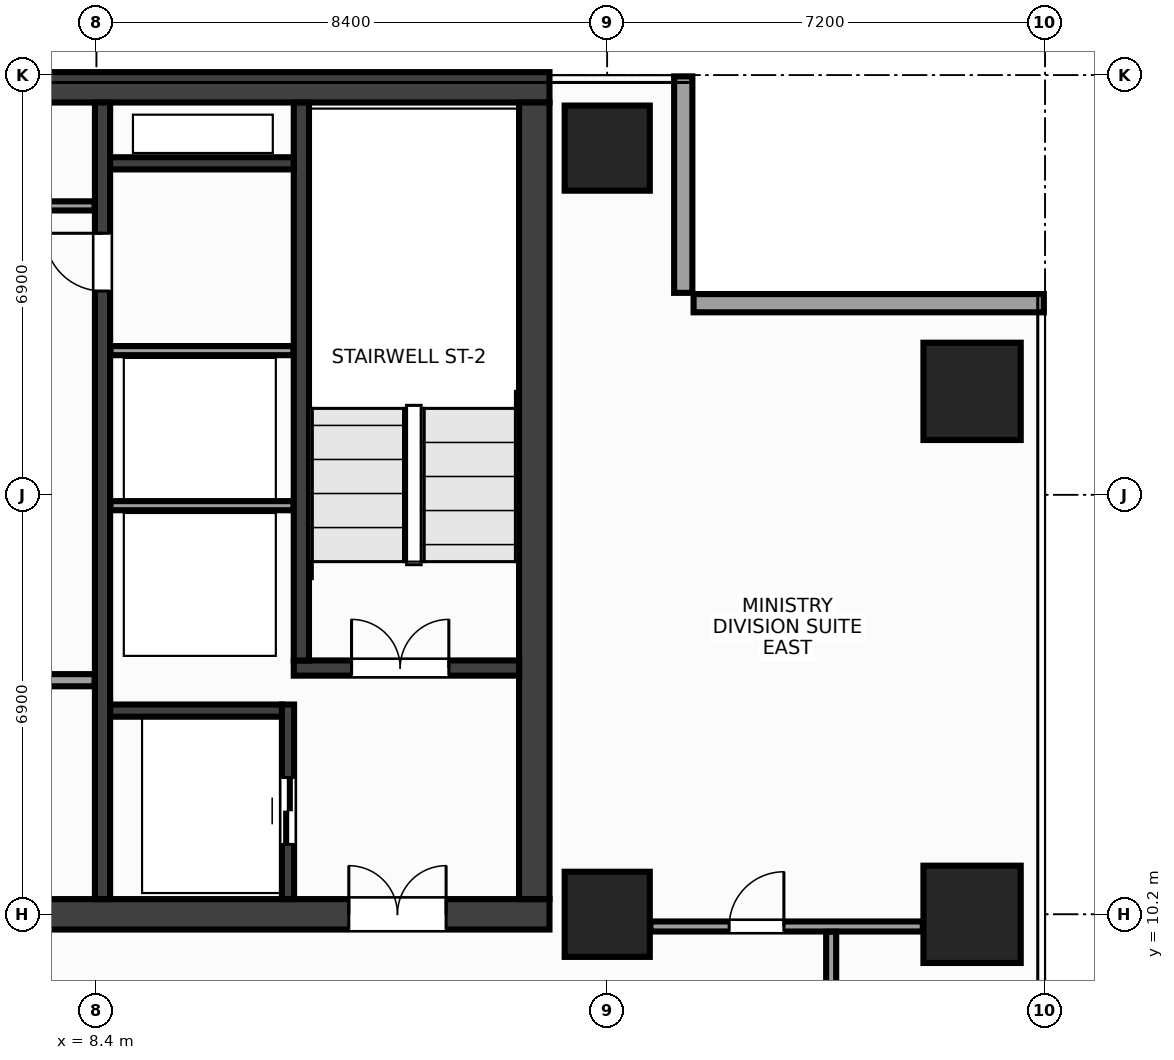
"""IFC4 building model, lengths in metres.
Left out: names, types, materials, properties, quantities, classifications, styles, units other than length and angle.
Written with IfcOpenShell. Run it as: python <this file> out.ifc"""

import sys

from ifc_helpers import new_model, si_unit, direction, frame, frame_2d, origin, origin_2d, place, context, subcontext, project, spatial, rectangle, extrude, source, transform, mapped, element, fill, save


model = new_model("IFC4")
c1 = context("Model", 3, precision=1e-05, world=origin(), true_north=direction((0.0, 1.0)))
c2 = subcontext(c1, "Body", "Model", "MODEL_VIEW")
j1 = project(units=[si_unit("LENGTHUNIT", "METRE"), si_unit("PLANEANGLEUNIT", "RADIAN")], contexts=[c1])
p1 = place(None, origin())
s1 = spatial("IfcSite", under=j1, at=p1, CompositionType="ELEMENT")
p2 = place(p1, origin())
s2 = spatial("IfcBuilding", under=s1, at=p2, CompositionType="ELEMENT")
p3 = place(p2, frame((0.0, 0.0, 218.0)))
s3 = spatial("IfcBuildingStorey", under=s2, at=p3, CompositionType="ELEMENT", Elevation=218.0)
m1 = source(origin(), c2, "Body", "SweptSolid", [
    extrude(rectangle(XDim=31.7, YDim=0.5, at=frame_2d((15.85, 0.0))), origin(), (0.0, 0.0, 1.0), 3.6),
])
p4 = place(p3, frame((-15.85, 23.8, 0.0), z_axis=(0.0, 0.0, 1.0), x_axis=(1.0, 0.0, 0.0)))
e1 = element("IfcWall", 1, at=p4, inside=s3, PredefinedType="SHEAR", context=c2, shape_type="MappedRepresentation", body=[
    mapped(m1, transform((0.0, 0.0, 0.0), x_axis=(1.0, 0.0, 0.0), y_axis=(0.0, 1.0, 0.0), z_axis=(0.0, 0.0, 1.0), scale=1.0)),
])
p5 = place(p3, frame((-15.85, 10.2, 0.0), z_axis=(0.0, 0.0, 1.0), x_axis=(1.0, 0.0, 0.0)))
e2 = element("IfcWall", 2, at=p5, inside=s3, PredefinedType="SHEAR", context=c2, shape_type="MappedRepresentation", body=[
    mapped(m1, transform((0.0, 0.0, 0.0), x_axis=(1.0, 0.0, 0.0), y_axis=(0.0, 1.0, 0.0), z_axis=(0.0, 0.0, 1.0), scale=1.0)),
])
p6 = place(p5, frame((1.7, 0.0, 0.0)))
e3 = element("IfcOpeningElement", 3, at=p6, cuts=e2, PredefinedType="OPENING", context=c2, shape_type="SweptSolid", body=[
    extrude(rectangle(XDim=1.6, YDim=2.15, at=frame_2d((0.8, 1.075))), frame((0.0, 0.262, 0.0), z_axis=(0.0, -1.0, 0.0), x_axis=(1.0, 0.0, 0.0)), (0.0, 0.0, 1.0), 0.524),
])
p7 = place(p5, frame((28.4, 0.0, 0.0)))
e4 = element("IfcOpeningElement", 4, at=p7, cuts=e2, PredefinedType="OPENING", context=c2, shape_type="SweptSolid", body=[
    extrude(rectangle(XDim=1.6, YDim=2.15, at=frame_2d((0.8, 1.075))), frame((0.0, 0.262, 0.0), z_axis=(0.0, -1.0, 0.0), x_axis=(1.0, 0.0, 0.0)), (0.0, 0.0, 1.0), 0.524),
])
p8 = place(p5, frame((15.1, 0.0, 0.0)))
e5 = element("IfcOpeningElement", 5, at=p8, cuts=e2, PredefinedType="OPENING", context=c2, shape_type="SweptSolid", body=[
    extrude(rectangle(XDim=1.5, YDim=2.2, at=frame_2d((0.75, 1.1))), frame((0.0, 0.262, 0.0), z_axis=(0.0, -1.0, 0.0), x_axis=(1.0, 0.0, 0.0)), (0.0, 0.0, 1.0), 0.524),
])
m2 = source(origin(), c2, "Body", "SweptSolid", [
    extrude(rectangle(XDim=13.1, YDim=0.5, at=frame_2d((6.55, 0.0))), origin(), (0.0, 0.0, 1.0), 3.6),
])
p9 = place(p3, frame((15.6, 10.45, 0.0), z_axis=(0.0, 0.0, 1.0), x_axis=(0.0, 1.0, 0.0)))
e6 = element("IfcWall", 6, at=p9, inside=s3, PredefinedType="SHEAR", context=c2, shape_type="MappedRepresentation", body=[
    mapped(m2, transform((0.0, 0.0, 0.0), x_axis=(1.0, 0.0, 0.0), y_axis=(0.0, 1.0, 0.0), z_axis=(0.0, 0.0, 1.0), scale=1.0)),
])
m3 = source(origin(), c2, "Body", "SweptSolid", [
    extrude(rectangle(XDim=13.1, YDim=0.25, at=frame_2d((6.55, 0.0))), origin(), (0.0, 0.0, 1.0), 3.6),
])
p10 = place(p3, frame((8.5, 10.45, 0.0), z_axis=(0.0, 0.0, 1.0), x_axis=(0.0, 1.0, 0.0)))
e7 = element("IfcWall", 7, at=p10, inside=s3, PredefinedType="SHEAR", context=c2, shape_type="MappedRepresentation", body=[
    mapped(m3, transform((0.0, 0.0, 0.0), x_axis=(1.0, 0.0, 0.0), y_axis=(0.0, 1.0, 0.0), z_axis=(0.0, 0.0, 1.0), scale=1.0)),
])
p11 = place(p10, frame((10.0, 0.0, 0.0)))
e8 = element("IfcOpeningElement", 8, at=p11, cuts=e7, PredefinedType="OPENING", context=c2, shape_type="SweptSolid", body=[
    extrude(rectangle(XDim=0.95, YDim=2.15, at=frame_2d((0.475, 1.075))), frame((0.0, 0.137, 0.0), z_axis=(0.0, -1.0, 0.0), x_axis=(1.0, 0.0, 0.0)), (0.0, 0.0, 1.0), 0.274),
])
m4 = source(origin(), c2, "Body", "SweptSolid", [
    extrude(rectangle(XDim=3.705, YDim=0.25, at=frame_2d((1.853, 0.0))), origin(), (0.0, 0.0, 1.0), 3.6),
])
p12 = place(p3, frame((11.645, 14.25, 0.0), z_axis=(0.0, 0.0, 1.0), x_axis=(1.0, 0.0, 0.0)))
e9 = element("IfcWall", 9, at=p12, inside=s3, PredefinedType="SHEAR", context=c2, shape_type="MappedRepresentation", body=[
    mapped(m4, transform((0.0, 0.0, 0.0), x_axis=(1.0, 0.0, 0.0), y_axis=(0.0, 1.0, 0.0), z_axis=(0.0, 0.0, 1.0), scale=1.0)),
])
p13 = place(p12, frame((0.95, 0.0, 0.0)))
e10 = element("IfcOpeningElement", 10, at=p13, cuts=e9, PredefinedType="OPENING", context=c2, shape_type="SweptSolid", body=[
    extrude(rectangle(XDim=1.6, YDim=2.15, at=frame_2d((0.8, 1.075))), frame((0.0, 0.137, 0.0), z_axis=(0.0, -1.0, 0.0), x_axis=(1.0, 0.0, 0.0)), (0.0, 0.0, 1.0), 0.274),
])
m5 = source(origin(), c2, "Body", "SweptSolid", [
    extrude(rectangle(XDim=9.175, YDim=0.25, at=frame_2d((4.587, 0.0))), origin(), (0.0, 0.0, 1.0), 3.6),
])
p14 = place(p3, frame((11.77, 14.375, 0.0), z_axis=(0.0, 0.0, 1.0), x_axis=(0.0, 1.0, 0.0)))
e11 = element("IfcWall", 11, at=p14, inside=s3, PredefinedType="SHEAR", context=c2, shape_type="MappedRepresentation", body=[
    mapped(m5, transform((0.0, 0.0, 0.0), x_axis=(1.0, 0.0, 0.0), y_axis=(0.0, 1.0, 0.0), z_axis=(0.0, 0.0, 1.0), scale=1.0)),
])
m6 = source(origin(), c2, "Body", "SweptSolid", [
    extrude(rectangle(XDim=3.2, YDim=0.2, at=frame_2d((1.6, 0.0))), origin(), (0.0, 0.0, 1.0), 3.6),
])
p15 = place(p3, frame((11.55, 10.45, 0.0), z_axis=(0.0, 0.0, 1.0), x_axis=(0.0, 1.0, 0.0)))
e12 = element("IfcWall", 12, at=p15, inside=s3, PredefinedType="SHEAR", context=c2, shape_type="MappedRepresentation", body=[
    mapped(m6, transform((0.0, 0.0, 0.0), x_axis=(1.0, 0.0, 0.0), y_axis=(0.0, 1.0, 0.0), z_axis=(0.0, 0.0, 1.0), scale=1.0)),
])
p16 = place(p15, frame((0.9, 0.0, 0.0)))
e13 = element("IfcOpeningElement", 13, at=p16, cuts=e12, PredefinedType="OPENING", context=c2, shape_type="SweptSolid", body=[
    extrude(rectangle(XDim=1.1, YDim=2.15, at=frame_2d((0.55, 1.075))), frame((0.0, 0.112, 0.0), z_axis=(0.0, -1.0, 0.0), x_axis=(1.0, 0.0, 0.0)), (0.0, 0.0, 1.0), 0.224),
])
m7 = source(origin(), c2, "Body", "SweptSolid", [
    extrude(rectangle(XDim=2.825, YDim=0.2, at=frame_2d((1.413, 0.0))), origin(), (0.0, 0.0, 1.0), 3.6),
])
p17 = place(p3, frame((8.625, 13.55, 0.0), z_axis=(0.0, 0.0, 1.0), x_axis=(1.0, 0.0, 0.0)))
e14 = element("IfcWall", 14, at=p17, inside=s3, PredefinedType="SHEAR", context=c2, shape_type="MappedRepresentation", body=[
    mapped(m7, transform((0.0, 0.0, 0.0), x_axis=(1.0, 0.0, 0.0), y_axis=(0.0, 1.0, 0.0), z_axis=(0.0, 0.0, 1.0), scale=1.0)),
])
m8 = source(origin(), c2, "Body", "SweptSolid", [
    extrude(rectangle(XDim=3.02, YDim=0.2, at=frame_2d((1.51, 0.0))), origin(), (0.0, 0.0, 1.0), 3.6),
])
p18 = place(p3, frame((8.625, 22.55, 0.0), z_axis=(0.0, 0.0, 1.0), x_axis=(1.0, 0.0, 0.0)))
e15 = element("IfcWall", 15, at=p18, inside=s3, PredefinedType="SHEAR", context=c2, shape_type="MappedRepresentation", body=[
    mapped(m8, transform((0.0, 0.0, 0.0), x_axis=(1.0, 0.0, 0.0), y_axis=(0.0, 1.0, 0.0), z_axis=(0.0, 0.0, 1.0), scale=1.0)),
])
m9 = source(origin(), c2, "Body", "SweptSolid", [
    extrude(rectangle(XDim=1.4, YDim=1.4, at=origin_2d()), origin(), (0.0, 0.0, 1.0), 3.6),
])
for number, where, z_axis, x_axis in (
    (16, (16.8, 10.2, 0.0), (0.0, 0.0, 1.0), (1.0, 0.0, 0.0)),
    (17, (16.8, 22.8, 0.0), (0.0, 0.0, 1.0), (1.0, 0.0, 0.0)),
):
    element("IfcColumn", number, at=place(p3, frame(where, z_axis=z_axis, x_axis=x_axis)), inside=s3, PredefinedType="COLUMN", context=c2, shape_type="MappedRepresentation", body=[
        mapped(m9, transform((0.0, 0.0, 0.0), x_axis=(1.0, 0.0, 0.0), y_axis=(0.0, 1.0, 0.0), z_axis=(0.0, 0.0, 1.0), scale=1.0)),
    ])
m10 = source(origin(), c2, "Body", "SweptSolid", [
    extrude(rectangle(XDim=1.6, YDim=1.6, at=origin_2d()), origin(), (0.0, 0.0, 1.0), 3.6),
])
for number, where, z_axis, x_axis in (
    (18, (22.8, 10.2, 0.0), (0.0, 0.0, 1.0), (1.0, 0.0, 0.0)),
    (19, (22.8, 18.8, 0.0), (0.0, 0.0, 1.0), (1.0, 0.0, 0.0)),
):
    element("IfcColumn", number, at=place(p3, frame(where, z_axis=z_axis, x_axis=x_axis)), inside=s3, PredefinedType="COLUMN", context=c2, shape_type="MappedRepresentation", body=[
        mapped(m10, transform((0.0, 0.0, 0.0), x_axis=(1.0, 0.0, 0.0), y_axis=(0.0, 1.0, 0.0), z_axis=(0.0, 0.0, 1.0), scale=1.0)),
    ])
m11 = source(origin(), c2, "Body", "SweptSolid", [
    extrude(rectangle(XDim=5.76, YDim=0.3, at=frame_2d((2.88, 0.0))), origin(), (0.0, 0.0, 1.0), 2.76),
])
p19 = place(p3, frame((23.98, 20.25, 0.0), z_axis=(0.0, 0.0, 1.0), x_axis=(-1.0, 0.0, 0.0)))
e20 = element("IfcWall", 20, at=p19, inside=s3, PredefinedType="STANDARD", context=c2, shape_type="MappedRepresentation", body=[
    mapped(m11, transform((0.0, 0.0, 0.0), x_axis=(1.0, 0.0, 0.0), y_axis=(0.0, 1.0, 0.0), z_axis=(0.0, 0.0, 1.0), scale=1.0)),
])
m12 = source(origin(), c2, "Body", "SweptSolid", [
    extrude(rectangle(XDim=3.56, YDim=0.3, at=frame_2d((1.78, 0.0))), origin(), (0.0, 0.0, 1.0), 2.76),
])
p20 = place(p3, frame((18.05, 20.42, 0.0), z_axis=(0.0, 0.0, 1.0), x_axis=(0.0, 1.0, 0.0)))
e21 = element("IfcWall", 21, at=p20, inside=s3, PredefinedType="STANDARD", context=c2, shape_type="MappedRepresentation", body=[
    mapped(m12, transform((0.0, 0.0, 0.0), x_axis=(1.0, 0.0, 0.0), y_axis=(0.0, 1.0, 0.0), z_axis=(0.0, 0.0, 1.0), scale=1.0)),
])
m13 = source(origin(), c2, "Body", "SweptSolid", [
    extrude(rectangle(XDim=3.01, YDim=0.15, at=frame_2d((1.505, 0.0))), origin(), (0.0, 0.0, 1.0), 3.38),
])
for number, where, z_axis, x_axis in (
    (22, (8.63, 16.92, 0.0), (0.0, 0.0, 1.0), (1.0, 0.0, 0.0)),
    (23, (8.63, 19.47, 0.0), (0.0, 0.0, 1.0), (1.0, 0.0, 0.0)),
):
    element("IfcWall", number, at=place(p3, frame(where, z_axis=z_axis, x_axis=x_axis)), inside=s3, PredefinedType="PARTITIONING", context=c2, shape_type="MappedRepresentation", body=[
        mapped(m13, transform((0.0, 0.0, 0.0), x_axis=(1.0, 0.0, 0.0), y_axis=(0.0, 1.0, 0.0), z_axis=(0.0, 0.0, 1.0), scale=1.0)),
    ])
m14 = source(origin(), c2, "Body", "SweptSolid", [
    extrude(rectangle(XDim=7.07, YDim=0.2, at=frame_2d((3.535, 0.0))), origin(), (0.0, 0.0, 1.0), 3.38),
])
p21 = place(p3, frame((1.3, 14.05, 0.0), z_axis=(0.0, 0.0, 1.0), x_axis=(1.0, 0.0, 0.0)))
e24 = element("IfcWall", 24, at=p21, inside=s3, PredefinedType="PARTITIONING", context=c2, shape_type="MappedRepresentation", body=[
    mapped(m14, transform((0.0, 0.0, 0.0), x_axis=(1.0, 0.0, 0.0), y_axis=(0.0, 1.0, 0.0), z_axis=(0.0, 0.0, 1.0), scale=1.0)),
])
p22 = place(p21, frame((1.16, 0.0, 0.0)))
e25 = element("IfcOpeningElement", 25, at=p22, cuts=e24, PredefinedType="OPENING", context=c2, shape_type="SweptSolid", body=[
    extrude(rectangle(XDim=0.9, YDim=2.15, at=frame_2d((0.45, 1.075))), frame((0.0, 0.112, 0.0), z_axis=(0.0, -1.0, 0.0), x_axis=(1.0, 0.0, 0.0)), (0.0, 0.0, 1.0), 0.224),
])
p23 = place(p21, frame((4.61, 0.0, 0.0)))
e26 = element("IfcOpeningElement", 26, at=p23, cuts=e24, PredefinedType="OPENING", context=c2, shape_type="SweptSolid", body=[
    extrude(rectangle(XDim=0.9, YDim=2.15, at=frame_2d((0.45, 1.075))), frame((0.0, 0.112, 0.0), z_axis=(0.0, -1.0, 0.0), x_axis=(1.0, 0.0, 0.0)), (0.0, 0.0, 1.0), 0.224),
])
m15 = source(origin(), c2, "Body", "SweptSolid", [
    extrude(rectangle(XDim=2.07, YDim=0.15, at=frame_2d((1.035, 0.0))), origin(), (0.0, 0.0, 1.0), 3.38),
])
p24 = place(p3, frame((6.3, 21.85, 0.0), z_axis=(0.0, 0.0, 1.0), x_axis=(1.0, 0.0, 0.0)))
e27 = element("IfcWall", 27, at=p24, inside=s3, PredefinedType="PARTITIONING", context=c2, shape_type="MappedRepresentation", body=[
    mapped(m15, transform((0.0, 0.0, 0.0), x_axis=(1.0, 0.0, 0.0), y_axis=(0.0, 1.0, 0.0), z_axis=(0.0, 0.0, 1.0), scale=1.0)),
])
m16 = source(origin(), c2, "Body", "SweptSolid", [
    extrude(rectangle(XDim=4.48, YDim=0.165, at=frame_2d((2.24, 0.0))), origin(), (0.0, 0.0, 1.0), 2.915),
])
p25 = place(p3, frame((17.51, 10.0, 0.0), z_axis=(0.0, 0.0, 1.0), x_axis=(1.0, 0.0, 0.0)))
e28 = element("IfcWall", 28, at=p25, inside=s3, PredefinedType="PARTITIONING", context=c2, shape_type="MappedRepresentation", body=[
    mapped(m16, transform((0.0, 0.0, 0.0), x_axis=(1.0, 0.0, 0.0), y_axis=(0.0, 1.0, 0.0), z_axis=(0.0, 0.0, 1.0), scale=1.0)),
])
p26 = place(p25, frame((1.295, 0.0, 0.0)))
e29 = element("IfcOpeningElement", 29, at=p26, cuts=e28, PredefinedType="OPENING", context=c2, shape_type="SweptSolid", body=[
    extrude(rectangle(XDim=0.9, YDim=2.15, at=frame_2d((0.45, 1.075))), frame((0.0, 0.094, 0.0), z_axis=(0.0, -1.0, 0.0), x_axis=(1.0, 0.0, 0.0)), (0.0, 0.0, 1.0), 0.189),
])
m17 = source(origin(), c2, "Body", "SweptSolid", [
    extrude(rectangle(XDim=2.358, YDim=0.165, at=frame_2d((1.179, 0.0))), origin(), (0.0, 0.0, 1.0), 3.38),
])
p27 = place(p3, frame((20.482, 7.555, 0.0), z_axis=(0.0, 0.0, 1.0), x_axis=(0.0, 1.0, 0.0)))
e30 = element("IfcWall", 30, at=p27, inside=s3, PredefinedType="PARTITIONING", context=c2, shape_type="MappedRepresentation", body=[
    mapped(m17, transform((0.0, 0.0, 0.0), x_axis=(1.0, 0.0, 0.0), y_axis=(0.0, 1.0, 0.0), z_axis=(0.0, 0.0, 1.0), scale=1.0)),
])
m18 = source(origin(), c2, "Body", "SweptSolid", [
    extrude(rectangle(XDim=1.6, YDim=2.15, at=frame_2d((0.8, 1.075))), frame((0.0, 0.025, 0.0), z_axis=(0.0, -1.0, 0.0), x_axis=(1.0, 0.0, 0.0)), (0.0, 0.0, 1.0), 0.05),
])
p28 = place(p13, origin())
e31 = element("IfcDoor", 31, at=p28, inside=s3, OperationType="DOUBLE_DOOR_SINGLE_SWING", PredefinedType="DOOR", context=c2, shape_type="MappedRepresentation", body=[
    mapped(m18, transform((0.0, 0.0, 0.0), x_axis=(1.0, 0.0, 0.0), y_axis=(0.0, 1.0, 0.0), z_axis=(0.0, 0.0, 1.0), scale=1.0)),
])
fill(e10, e31)
p29 = place(p7, origin())
e32 = element("IfcDoor", 32, at=p29, inside=s3, OperationType="DOUBLE_DOOR_SINGLE_SWING", PredefinedType="DOOR", context=c2, shape_type="MappedRepresentation", body=[
    mapped(m18, transform((0.0, 0.0, 0.0), x_axis=(1.0, 0.0, 0.0), y_axis=(0.0, 1.0, 0.0), z_axis=(0.0, 0.0, 1.0), scale=1.0)),
])
fill(e4, e32)
m19 = source(origin(), c2, "Body", "SweptSolid", [
    extrude(rectangle(XDim=1.1, YDim=2.15, at=frame_2d((0.55, 1.075))), frame((0.0, 0.025, 0.0), z_axis=(0.0, -1.0, 0.0), x_axis=(1.0, 0.0, 0.0)), (0.0, 0.0, 1.0), 0.05),
])
p30 = place(p16, origin())
e33 = element("IfcDoor", 33, at=p30, inside=s3, OperationType="DOUBLE_DOOR_SLIDING", PredefinedType="DOOR", context=c2, shape_type="MappedRepresentation", body=[
    mapped(m19, transform((0.0, 0.0, 0.0), x_axis=(1.0, 0.0, 0.0), y_axis=(0.0, 1.0, 0.0), z_axis=(0.0, 0.0, 1.0), scale=1.0)),
])
fill(e13, e33)
m20 = source(origin(), c2, "Body", "SweptSolid", [
    extrude(rectangle(XDim=0.95, YDim=2.15, at=frame_2d((0.475, 1.075))), frame((0.0, 0.025, 0.0), z_axis=(0.0, -1.0, 0.0), x_axis=(1.0, 0.0, 0.0)), (0.0, 0.0, 1.0), 0.05),
])
p31 = place(p11, origin())
e34 = element("IfcDoor", 34, at=p31, inside=s3, OperationType="SINGLE_SWING_RIGHT", PredefinedType="DOOR", context=c2, shape_type="MappedRepresentation", body=[
    mapped(m20, transform((0.0, 0.0, 0.0), x_axis=(1.0, 0.0, 0.0), y_axis=(0.0, 1.0, 0.0), z_axis=(0.0, 0.0, 1.0), scale=1.0)),
])
fill(e8, e34)
m21 = source(origin(), c2, "Body", "SweptSolid", [
    extrude(rectangle(XDim=0.9, YDim=2.15, at=frame_2d((0.45, 1.075))), frame((0.0, 0.025, 0.0), z_axis=(0.0, -1.0, 0.0), x_axis=(1.0, 0.0, 0.0)), (0.0, 0.0, 1.0), 0.05),
])
p32 = place(p26, origin())
e35 = element("IfcDoor", 35, at=p32, inside=s3, OperationType="SINGLE_SWING_RIGHT", PredefinedType="DOOR", context=c2, shape_type="MappedRepresentation", body=[
    mapped(m21, transform((0.0, 0.0, 0.0), x_axis=(1.0, 0.0, 0.0), y_axis=(0.0, 1.0, 0.0), z_axis=(0.0, 0.0, 1.0), scale=1.0)),
])
fill(e29, e35)
save(model, sys.argv[1])
